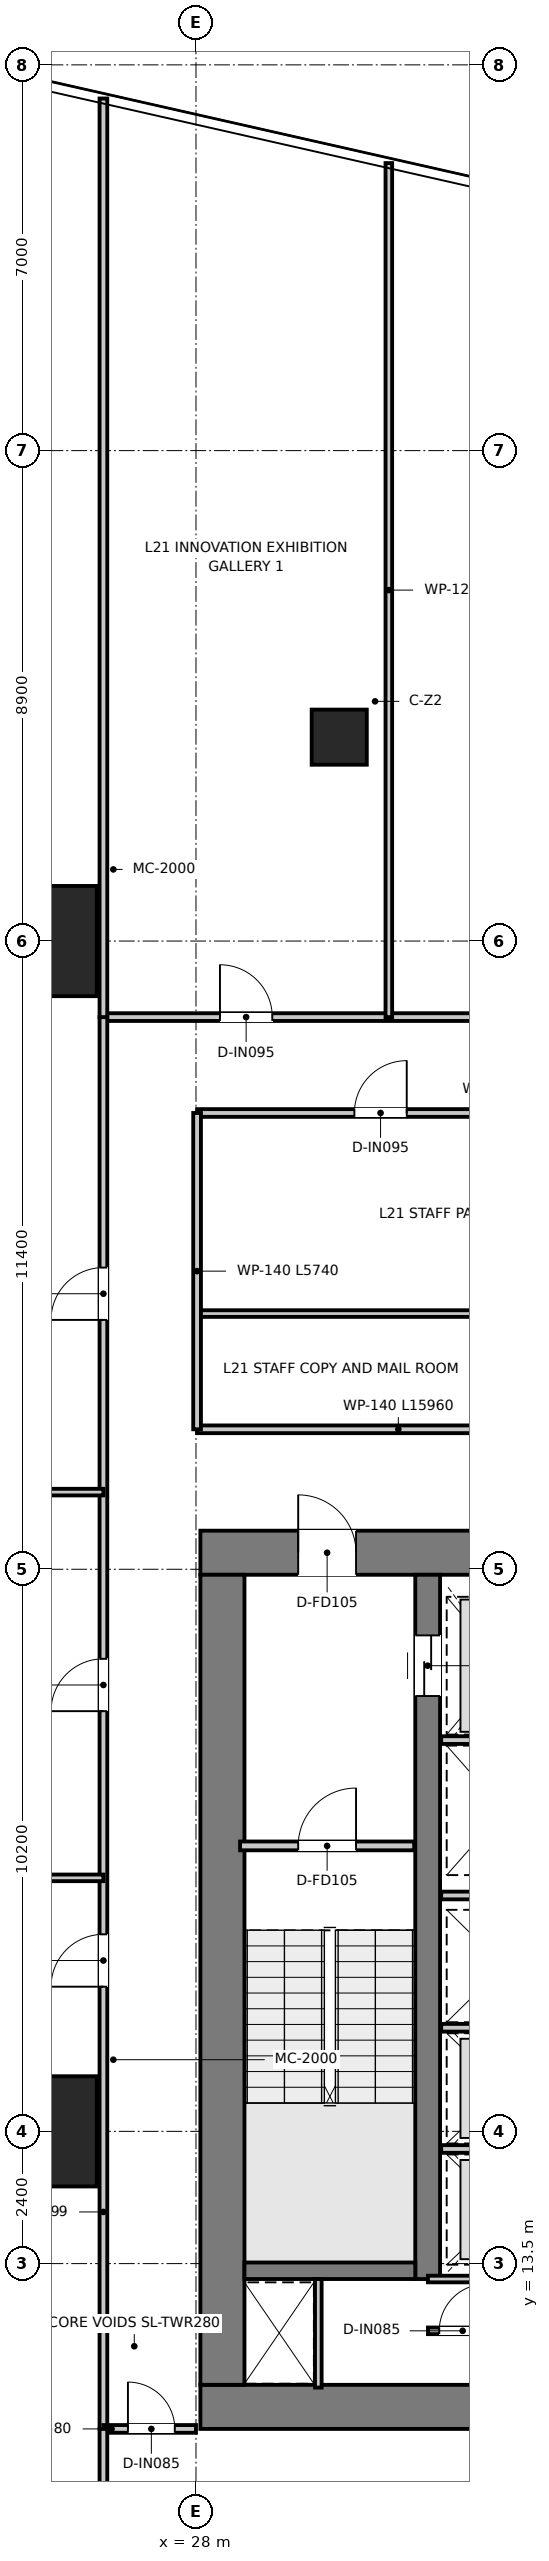
"""IFC4 building model, lengths in metres.
Left out: names, types, materials, properties, quantities, classifications, styles, units other than length and angle.
Written with IfcOpenShell. Run it as: python <this file> out.ifc"""

import sys

from ifc_helpers import new_model, si_unit, direction, frame, frame_2d, origin, origin_2d, place, context, subcontext, project, spatial, rectangle, extrude, source, transform, mapped, element, fill, save


model = new_model("IFC4")
c1 = context("Model", 3, precision=1e-05, world=origin(), true_north=direction((0.0, 1.0)))
c2 = subcontext(c1, "Body", "Model", "MODEL_VIEW")
j1 = project(units=[si_unit("LENGTHUNIT", "METRE"), si_unit("PLANEANGLEUNIT", "RADIAN")], contexts=[c1])
p1 = place(None, origin())
s1 = spatial("IfcSite", under=j1, at=p1, CompositionType="ELEMENT")
p2 = place(p1, origin())
s2 = spatial("IfcBuilding", under=s1, at=p2, CompositionType="ELEMENT")
p3 = place(p2, frame((0.0, 0.0, 90.05)))
s3 = spatial("IfcBuildingStorey", under=s2, at=p3, CompositionType="ELEMENT", Elevation=90.05)
p4 = place(p3, frame((28.08, 10.9, 0.0), z_axis=(0.0, 0.0, 1.0), x_axis=(1.0, 0.0, 0.0)))
e1 = element("IfcWall", 1, at=p4, inside=s3, PredefinedType="SHEAR", context=c2, shape_type="SweptSolid", body=[
    extrude(rectangle(XDim=15.84, YDim=0.8, at=frame_2d((7.92, 0.0))), origin(), (0.0, 0.0, 1.0), 3.95),
])
p5 = place(p3, frame((28.08, 26.4, 0.0), z_axis=(0.0, 0.0, 1.0), x_axis=(1.0, 0.0, 0.0)))
e2 = element("IfcWall", 2, at=p5, inside=s3, PredefinedType="SHEAR", context=c2, shape_type="SweptSolid", body=[
    extrude(rectangle(XDim=15.84, YDim=0.8, at=frame_2d((7.92, 0.0))), origin(), (0.0, 0.0, 1.0), 3.95),
])
p6 = place(p5, frame((7.22, 0.0, 0.0)))
e3 = element("IfcOpeningElement", 3, at=p6, cuts=e2, PredefinedType="OPENING", context=c2, shape_type="SweptSolid", body=[
    extrude(rectangle(XDim=1.4, YDim=2.2, at=frame_2d((0.7, 1.1))), frame((0.0, 0.41, 0.0), z_axis=(0.0, -1.0, 0.0), x_axis=(1.0, 0.0, 0.0)), (0.0, 0.0, 1.0), 0.82),
])
p7 = place(p5, frame((1.775, 0.0, 0.0)))
e4 = element("IfcOpeningElement", 4, at=p7, cuts=e2, PredefinedType="OPENING", context=c2, shape_type="SweptSolid", body=[
    extrude(rectangle(XDim=1.05, YDim=2.1, at=frame_2d((0.525, 1.05))), frame((0.0, 0.41, 0.0), z_axis=(0.0, -1.0, 0.0), x_axis=(1.0, 0.0, 0.0)), (0.0, 0.0, 1.0), 0.82),
])
p8 = place(p5, frame((13.015, 0.0, 0.0)))
e5 = element("IfcOpeningElement", 5, at=p8, cuts=e2, PredefinedType="OPENING", context=c2, shape_type="SweptSolid", body=[
    extrude(rectangle(XDim=1.05, YDim=2.1, at=frame_2d((0.525, 1.05))), frame((0.0, 0.41, 0.0), z_axis=(0.0, -1.0, 0.0), x_axis=(1.0, 0.0, 0.0)), (0.0, 0.0, 1.0), 0.82),
])
p9 = place(p3, frame((28.48, 11.3, 0.0), z_axis=(0.0, 0.0, 1.0), x_axis=(0.0, 1.0, 0.0)))
e6 = element("IfcWall", 6, at=p9, inside=s3, PredefinedType="SHEAR", context=c2, shape_type="SweptSolid", body=[
    extrude(rectangle(XDim=14.7, YDim=0.8, at=frame_2d((7.35, 0.0))), origin(), (0.0, 0.0, 1.0), 3.95),
])
p10 = place(p3, frame((32.205, 13.22, 0.0), z_axis=(0.0, 0.0, 1.0), x_axis=(0.0, 1.0, 0.0)))
e7 = element("IfcWall", 7, at=p10, inside=s3, PredefinedType="SHEAR", context=c2, shape_type="SweptSolid", body=[
    extrude(rectangle(XDim=12.78, YDim=0.45, at=frame_2d((6.39, 0.0))), origin(), (0.0, 0.0, 1.0), 3.95),
])
p11 = place(p10, frame((10.58, 0.0, 0.0)))
e8 = element("IfcOpeningElement", 8, at=p11, cuts=e7, PredefinedType="OPENING", context=c2, shape_type="SweptSolid", body=[
    extrude(rectangle(XDim=1.1, YDim=2.15, at=frame_2d((0.55, 1.075))), frame((0.0, 0.235, 0.0), z_axis=(0.0, -1.0, 0.0), x_axis=(1.0, 0.0, 0.0)), (0.0, 0.0, 1.0), 0.47),
])
p12 = place(p3, frame((28.88, 13.37, 0.0), z_axis=(0.0, 0.0, 1.0), x_axis=(1.0, 0.0, 0.0)))
e9 = element("IfcWall", 9, at=p12, inside=s3, PredefinedType="SHEAR", context=c2, shape_type="SweptSolid", body=[
    extrude(rectangle(XDim=3.1, YDim=0.3, at=frame_2d((1.55, 0.0))), origin(), (0.0, 0.0, 1.0), 3.95),
])
m1 = source(origin(), c2, "Body", "SweptSolid", [
    extrude(rectangle(XDim=2.0, YDim=2.0, at=origin_2d()), origin(), (0.0, 0.0, 1.0), 3.95),
])
for number, where, z_axis, x_axis in (
    (10, (25.2, 15.9, 0.0), (0.0, 0.0, 1.0), (1.0, 0.0, 0.0)),
    (11, (25.2, 37.5, 0.0), (0.0, 0.0, 1.0), (1.0, 0.0, 0.0)),
):
    element("IfcColumn", number, at=place(p3, frame(where, z_axis=z_axis, x_axis=x_axis)), inside=s3, PredefinedType="USERDEFINED", context=c2, shape_type="MappedRepresentation", body=[
        mapped(m1, transform((0.0, 0.0, 0.0), x_axis=(1.0, 0.0, 0.0), y_axis=(0.0, 1.0, 0.0), z_axis=(0.0, 0.0, 1.0), scale=1.0)),
    ])
m2 = source(origin(), c2, "Body", "SweptSolid", [
    extrude(rectangle(XDim=1.0, YDim=1.0, at=origin_2d()), origin(), (0.0, 0.0, 1.0), 3.95),
])
p13 = place(p3, frame((30.6, 41.2, 0.0), z_axis=(0.0, 0.0, 1.0), x_axis=(1.0, 0.0, 0.0)))
e12 = element("IfcColumn", 12, at=p13, inside=s3, PredefinedType="COLUMN", context=c2, shape_type="MappedRepresentation", body=[
    mapped(m2, transform((0.0, 0.0, 0.0), x_axis=(1.0, 0.0, 0.0), y_axis=(0.0, 1.0, 0.0), z_axis=(0.0, 0.0, 1.0), scale=1.0)),
])
p14 = place(p3, frame((28.8, 21.08, 0.0), z_axis=(0.0, 0.0, 1.0), x_axis=(1.0, 0.0, 0.0)))
e13 = element("IfcWall", 13, at=p14, inside=s3, PredefinedType="PARTITIONING", context=c2, shape_type="SweptSolid", body=[
    extrude(rectangle(XDim=3.16, YDim=0.16, at=frame_2d((1.58, 0.0))), origin(), (0.0, 0.0, 1.0), 3.67),
])
p15 = place(p14, frame((1.055, 0.0, 0.0)))
e14 = element("IfcOpeningElement", 14, at=p15, cuts=e13, PredefinedType="OPENING", context=c2, shape_type="SweptSolid", body=[
    extrude(rectangle(XDim=1.05, YDim=2.1, at=frame_2d((0.525, 1.05))), frame((0.0, 0.09, 0.0), z_axis=(0.0, -1.0, 0.0), x_axis=(1.0, 0.0, 0.0)), (0.0, 0.0, 1.0), 0.18),
])
p16 = place(p3, frame((32.45, 23.0, 0.0), z_axis=(0.0, 0.0, 1.0), x_axis=(1.0, 0.0, 0.0)))
e15 = element("IfcWall", 15, at=p16, inside=s3, PredefinedType="PARTITIONING", context=c2, shape_type="SweptSolid", body=[
    extrude(rectangle(XDim=2.27, YDim=0.14, at=frame_2d((1.135, 0.0))), origin(), (0.0, 0.0, 1.0), 2.47),
])
for number, where, z_axis, x_axis in (
    (16, (32.45, 17.78, 0.0), (0.0, 0.0, 1.0), (1.0, 0.0, 0.0)),
    (17, (32.45, 20.18, 0.0), (0.0, 0.0, 1.0), (1.0, 0.0, 0.0)),
    (18, (32.45, 15.58, 0.0), (0.0, 0.0, 1.0), (1.0, 0.0, 0.0)),
):
    element("IfcWall", number, at=place(p3, frame(where, z_axis=z_axis, x_axis=x_axis)), inside=s3, PredefinedType="PARTITIONING", context=c2, shape_type="SweptSolid", body=[
        extrude(rectangle(XDim=2.27, YDim=0.14, at=frame_2d((1.135, 0.0))), origin(), (0.0, 0.0, 1.0), 3.67),
    ])
p17 = place(p3, frame((30.22, 11.25, 0.0), z_axis=(0.0, 0.0, 1.0), x_axis=(0.0, 1.0, 0.0)))
e19 = element("IfcWall", 19, at=p17, inside=s3, PredefinedType="PARTITIONING", context=c2, shape_type="SweptSolid", body=[
    extrude(rectangle(XDim=1.97, YDim=0.12, at=frame_2d((0.985, 0.0))), origin(), (0.0, 0.0, 1.0), 3.67),
])
p18 = place(p3, frame((32.21, 13.22, 0.0), z_axis=(0.0, 0.0, 1.0), x_axis=(1.0, 0.0, 0.0)))
e20 = element("IfcWall", 20, at=p18, inside=s3, PredefinedType="PARTITIONING", context=c2, shape_type="SweptSolid", body=[
    extrude(rectangle(XDim=7.58, YDim=0.12, at=frame_2d((3.79, 0.0))), origin(), (0.0, 0.0, 1.0), 3.67),
])
p19 = place(p18, frame((3.365, 0.0, 0.0)))
e21 = element("IfcOpeningElement", 21, at=p19, cuts=e20, PredefinedType="OPENING", context=c2, shape_type="SweptSolid", body=[
    extrude(rectangle(XDim=0.85, YDim=2.1, at=frame_2d((0.425, 1.05))), frame((0.0, 0.07, 0.0), z_axis=(0.0, -1.0, 0.0), x_axis=(1.0, 0.0, 0.0)), (0.0, 0.0, 1.0), 0.14),
])
p20 = place(p3, frame((32.21, 12.28, 0.0), z_axis=(0.0, 0.0, 1.0), x_axis=(1.0, 0.0, 0.0)))
e22 = element("IfcWall", 22, at=p20, inside=s3, PredefinedType="PARTITIONING", context=c2, shape_type="SweptSolid", body=[
    extrude(rectangle(XDim=7.58, YDim=0.12, at=frame_2d((3.79, 0.0))), origin(), (0.0, 0.0, 1.0), 3.67),
])
p21 = place(p20, frame((0.205, 0.0, 0.0)))
e23 = element("IfcOpeningElement", 23, at=p21, cuts=e22, PredefinedType="OPENING", context=c2, shape_type="SweptSolid", body=[
    extrude(rectangle(XDim=0.85, YDim=2.1, at=frame_2d((0.425, 1.05))), frame((0.0, 0.07, 0.0), z_axis=(0.0, -1.0, 0.0), x_axis=(1.0, 0.0, 0.0)), (0.0, 0.0, 1.0), 0.14),
])
p22 = place(p20, frame((2.095, 0.0, 0.0)))
e24 = element("IfcOpeningElement", 24, at=p22, cuts=e22, PredefinedType="OPENING", context=c2, shape_type="SweptSolid", body=[
    extrude(rectangle(XDim=0.85, YDim=2.1, at=frame_2d((0.425, 1.05))), frame((0.0, 0.07, 0.0), z_axis=(0.0, -1.0, 0.0), x_axis=(1.0, 0.0, 0.0)), (0.0, 0.0, 1.0), 0.14),
])
p23 = place(p20, frame((4.635, 0.0, 0.0)))
e25 = element("IfcOpeningElement", 25, at=p23, cuts=e22, PredefinedType="OPENING", context=c2, shape_type="SweptSolid", body=[
    extrude(rectangle(XDim=0.85, YDim=2.1, at=frame_2d((0.425, 1.05))), frame((0.0, 0.07, 0.0), z_axis=(0.0, -1.0, 0.0), x_axis=(1.0, 0.0, 0.0)), (0.0, 0.0, 1.0), 0.14),
])
p24 = place(p20, frame((6.525, 0.0, 0.0)))
e26 = element("IfcOpeningElement", 26, at=p24, cuts=e22, PredefinedType="OPENING", context=c2, shape_type="SweptSolid", body=[
    extrude(rectangle(XDim=0.85, YDim=2.1, at=frame_2d((0.425, 1.05))), frame((0.0, 0.07, 0.0), z_axis=(0.0, -1.0, 0.0), x_axis=(1.0, 0.0, 0.0)), (0.0, 0.0, 1.0), 0.14),
])
p25 = place(p3, frame((28.02, 28.64, 0.0), z_axis=(0.0, 0.0, 1.0), x_axis=(1.0, 0.0, 0.0)))
e27 = element("IfcWall", 27, at=p25, inside=s3, PredefinedType="PARTITIONING", context=c2, shape_type="SweptSolid", body=[
    extrude(rectangle(XDim=15.96, YDim=0.14, at=frame_2d((7.98, 0.0))), origin(), (0.0, 0.0, 1.0), 3.08),
])
p26 = place(p25, frame((7.455, 0.0, 0.0)))
e28 = element("IfcOpeningElement", 28, at=p26, cuts=e27, PredefinedType="OPENING", context=c2, shape_type="SweptSolid", body=[
    extrude(rectangle(XDim=1.05, YDim=2.15, at=frame_2d((0.525, 1.075))), frame((0.0, 0.08, 0.0), z_axis=(0.0, -1.0, 0.0), x_axis=(1.0, 0.0, 0.0)), (0.0, 0.0, 1.0), 0.16),
])
p27 = place(p3, frame((28.02, 30.74, 0.0), z_axis=(0.0, 0.0, 1.0), x_axis=(1.0, 0.0, 0.0)))
e29 = element("IfcWall", 29, at=p27, inside=s3, PredefinedType="PARTITIONING", context=c2, shape_type="SweptSolid", body=[
    extrude(rectangle(XDim=15.96, YDim=0.12, at=frame_2d((7.98, 0.0))), origin(), (0.0, 0.0, 1.0), 3.08),
])
p28 = place(p3, frame((28.02, 34.38, 0.0), z_axis=(0.0, 0.0, 1.0), x_axis=(1.0, 0.0, 0.0)))
e30 = element("IfcWall", 30, at=p28, inside=s3, PredefinedType="PARTITIONING", context=c2, shape_type="SweptSolid", body=[
    extrude(rectangle(XDim=15.96, YDim=0.14, at=frame_2d((7.98, 0.0))), origin(), (0.0, 0.0, 1.0), 3.08),
])
p29 = place(p28, frame((7.83, 0.0, 0.0)))
e31 = element("IfcOpeningElement", 31, at=p29, cuts=e30, PredefinedType="OPENING", context=c2, shape_type="SweptSolid", body=[
    extrude(rectangle(XDim=0.9, YDim=2.1, at=frame_2d((0.45, 1.05))), frame((0.0, 0.08, 0.0), z_axis=(0.0, -1.0, 0.0), x_axis=(1.0, 0.0, 0.0)), (0.0, 0.0, 1.0), 0.16),
])
p30 = place(p28, frame((11.03, 0.0, 0.0)))
e32 = element("IfcOpeningElement", 32, at=p30, cuts=e30, PredefinedType="OPENING", context=c2, shape_type="SweptSolid", body=[
    extrude(rectangle(XDim=0.9, YDim=2.1, at=frame_2d((0.45, 1.05))), frame((0.0, 0.08, 0.0), z_axis=(0.0, -1.0, 0.0), x_axis=(1.0, 0.0, 0.0)), (0.0, 0.0, 1.0), 0.16),
])
p31 = place(p28, frame((14.055, 0.0, 0.0)))
e33 = element("IfcOpeningElement", 33, at=p31, cuts=e30, PredefinedType="OPENING", context=c2, shape_type="SweptSolid", body=[
    extrude(rectangle(XDim=0.95, YDim=2.1, at=frame_2d((0.475, 1.05))), frame((0.0, 0.08, 0.0), z_axis=(0.0, -1.0, 0.0), x_axis=(1.0, 0.0, 0.0)), (0.0, 0.0, 1.0), 0.16),
])
p32 = place(p28, frame((2.855, 0.0, 0.0)))
e34 = element("IfcOpeningElement", 34, at=p32, cuts=e30, PredefinedType="OPENING", context=c2, shape_type="SweptSolid", body=[
    extrude(rectangle(XDim=0.95, YDim=2.1, at=frame_2d((0.475, 1.05))), frame((0.0, 0.08, 0.0), z_axis=(0.0, -1.0, 0.0), x_axis=(1.0, 0.0, 0.0)), (0.0, 0.0, 1.0), 0.16),
])
p33 = place(p3, frame((28.02, 28.64, 0.0), z_axis=(0.0, 0.0, 1.0), x_axis=(0.0, 1.0, 0.0)))
e35 = element("IfcWall", 35, at=p33, inside=s3, PredefinedType="PARTITIONING", context=c2, shape_type="SweptSolid", body=[
    extrude(rectangle(XDim=5.74, YDim=0.14, at=frame_2d((2.87, 0.0))), origin(), (0.0, 0.0, 1.0), 3.27),
])
p34 = place(p3, frame((26.32, 36.12, 0.0), z_axis=(0.0, 0.0, 1.0), x_axis=(1.0, 0.0, 0.0)))
e36 = element("IfcWall", 36, at=p34, inside=s3, PredefinedType="PARTITIONING", context=c2, shape_type="SweptSolid", body=[
    extrude(rectangle(XDim=19.36, YDim=0.14, at=frame_2d((9.68, 0.0))), origin(), (0.0, 0.0, 1.0), 3.08),
])
p35 = place(p34, frame((2.115, 0.0, 0.0)))
e37 = element("IfcOpeningElement", 37, at=p35, cuts=e36, PredefinedType="OPENING", context=c2, shape_type="SweptSolid", body=[
    extrude(rectangle(XDim=0.95, YDim=2.1, at=frame_2d((0.475, 1.05))), frame((0.0, 0.08, 0.0), z_axis=(0.0, -1.0, 0.0), x_axis=(1.0, 0.0, 0.0)), (0.0, 0.0, 1.0), 0.16),
])
p36 = place(p34, frame((8.705, 0.0, 0.0)))
e38 = element("IfcOpeningElement", 38, at=p36, cuts=e36, PredefinedType="OPENING", context=c2, shape_type="SweptSolid", body=[
    extrude(rectangle(XDim=0.95, YDim=2.1, at=frame_2d((0.475, 1.05))), frame((0.0, 0.08, 0.0), z_axis=(0.0, -1.0, 0.0), x_axis=(1.0, 0.0, 0.0)), (0.0, 0.0, 1.0), 0.16),
])
p37 = place(p34, frame((15.795, 0.0, 0.0)))
e39 = element("IfcOpeningElement", 39, at=p37, cuts=e36, PredefinedType="OPENING", context=c2, shape_type="SweptSolid", body=[
    extrude(rectangle(XDim=0.95, YDim=2.1, at=frame_2d((0.475, 1.05))), frame((0.0, 0.08, 0.0), z_axis=(0.0, -1.0, 0.0), x_axis=(1.0, 0.0, 0.0)), (0.0, 0.0, 1.0), 0.16),
])
p38 = place(p3, frame((26.32, 10.5, 0.0), z_axis=(0.0, 0.0, 1.0), x_axis=(0.0, 1.0, 0.0)))
e40 = element("IfcWall", 40, at=p38, inside=s3, PredefinedType="PARTITIONING", context=c2, shape_type="SweptSolid", body=[
    extrude(rectangle(XDim=25.62, YDim=0.14, at=frame_2d((12.81, 0.0))), origin(), (0.0, 0.0, 1.0), 2.97),
])
p39 = place(p38, frame((8.025, 0.0, 0.0)))
e41 = element("IfcOpeningElement", 41, at=p39, cuts=e40, PredefinedType="OPENING", context=c2, shape_type="SweptSolid", body=[
    extrude(rectangle(XDim=0.95, YDim=2.1, at=frame_2d((0.475, 1.05))), frame((0.0, 0.08, 0.0), z_axis=(0.0, -1.0, 0.0), x_axis=(1.0, 0.0, 0.0)), (0.0, 0.0, 1.0), 0.16),
])
p40 = place(p38, frame((13.025, 0.0, 0.0)))
e42 = element("IfcOpeningElement", 42, at=p40, cuts=e40, PredefinedType="OPENING", context=c2, shape_type="SweptSolid", body=[
    extrude(rectangle(XDim=0.95, YDim=2.1, at=frame_2d((0.475, 1.05))), frame((0.0, 0.08, 0.0), z_axis=(0.0, -1.0, 0.0), x_axis=(1.0, 0.0, 0.0)), (0.0, 0.0, 1.0), 0.16),
])
p41 = place(p38, frame((20.125, 0.0, 0.0)))
e43 = element("IfcOpeningElement", 43, at=p41, cuts=e40, PredefinedType="OPENING", context=c2, shape_type="SweptSolid", body=[
    extrude(rectangle(XDim=0.95, YDim=2.1, at=frame_2d((0.475, 1.05))), frame((0.0, 0.08, 0.0), z_axis=(0.0, -1.0, 0.0), x_axis=(1.0, 0.0, 0.0)), (0.0, 0.0, 1.0), 0.16),
])
p42 = place(p3, frame((26.32, 10.5, 0.0), z_axis=(0.0, 0.0, 1.0), x_axis=(1.0, 0.0, 0.0)))
e44 = element("IfcWall", 44, at=p42, inside=s3, PredefinedType="PARTITIONING", context=c2, shape_type="SweptSolid", body=[
    extrude(rectangle(XDim=1.68, YDim=0.14, at=frame_2d((0.84, 0.0))), origin(), (0.0, 0.0, 1.0), 3.67),
])
p43 = place(p42, frame((0.445, 0.0, 0.0)))
e45 = element("IfcOpeningElement", 45, at=p43, cuts=e44, PredefinedType="OPENING", context=c2, shape_type="SweptSolid", body=[
    extrude(rectangle(XDim=0.85, YDim=2.1, at=frame_2d((0.425, 1.05))), frame((0.0, 0.08, 0.0), z_axis=(0.0, -1.0, 0.0), x_axis=(1.0, 0.0, 0.0)), (0.0, 0.0, 1.0), 0.16),
])
p44 = place(p3, frame((26.32, 36.12, 0.0), z_axis=(0.0, 0.0, 1.0), x_axis=(0.0, 1.0, 0.0)))
e46 = element("IfcWall", 46, at=p44, inside=s3, PredefinedType="PARTITIONING", context=c2, shape_type="SweptSolid", body=[
    extrude(rectangle(XDim=16.67, YDim=0.14, at=frame_2d((8.335, 0.0))), origin(), (0.0, 0.0, 1.0), 2.97),
])
p45 = place(p3, frame((26.32, 4.991, 0.0), z_axis=(0.0, 0.0, 1.0), x_axis=(0.0, 1.0, 0.0)))
e47 = element("IfcWall", 47, at=p45, inside=s3, PredefinedType="PARTITIONING", context=c2, shape_type="SweptSolid", body=[
    extrude(rectangle(XDim=5.509, YDim=0.14, at=frame_2d((2.754, 0.0))), origin(), (0.0, 0.0, 1.0), 3.67),
])
p46 = place(p3, frame((31.5, 36.12, 0.0), z_axis=(0.0, 0.0, 1.0), x_axis=(0.0, 1.0, 0.0)))
e48 = element("IfcWall", 48, at=p46, inside=s3, PredefinedType="PARTITIONING", context=c2, shape_type="SweptSolid", body=[
    extrude(rectangle(XDim=15.497, YDim=0.12, at=frame_2d((7.749, 0.0))), origin(), (0.0, 0.0, 1.0), 2.97),
])
p47 = place(p3, frame((10.698, 20.5, 0.0), z_axis=(0.0, 0.0, 1.0), x_axis=(1.0, 0.0, 0.0)))
e49 = element("IfcWall", 49, at=p47, inside=s3, PredefinedType="PARTITIONING", context=c2, shape_type="SweptSolid", body=[
    extrude(rectangle(XDim=15.622, YDim=0.12, at=frame_2d((7.811, 0.0))), origin(), (0.0, 0.0, 1.0), 2.97),
])
p48 = place(p3, frame((12.282, 27.5, 0.0), z_axis=(0.0, 0.0, 1.0), x_axis=(1.0, 0.0, 0.0)))
e50 = element("IfcWall", 50, at=p48, inside=s3, PredefinedType="PARTITIONING", context=c2, shape_type="SweptSolid", body=[
    extrude(rectangle(XDim=14.038, YDim=0.12, at=frame_2d((7.019, 0.0))), origin(), (0.0, 0.0, 1.0), 2.97),
])
p49 = place(p15, origin())
e51 = element("IfcDoor", 51, at=p49, inside=s3, OperationType="SINGLE_SWING_RIGHT", PredefinedType="DOOR", context=c2, shape_type="SweptSolid", body=[
    extrude(rectangle(XDim=1.05, YDim=2.1, at=frame_2d((0.525, 1.05))), frame((0.0, 0.025, 0.0), z_axis=(0.0, -1.0, 0.0), x_axis=(1.0, 0.0, 0.0)), (0.0, 0.0, 1.0), 0.05),
])
fill(e14, e51)
p50 = place(p7, origin())
e52 = element("IfcDoor", 52, at=p50, inside=s3, OperationType="SINGLE_SWING_LEFT", PredefinedType="DOOR", context=c2, shape_type="SweptSolid", body=[
    extrude(rectangle(XDim=1.05, YDim=2.1, at=frame_2d((0.525, 1.05))), frame((0.0, 0.025, 0.0), z_axis=(0.0, -1.0, 0.0), x_axis=(1.0, 0.0, 0.0)), (0.0, 0.0, 1.0), 0.05),
])
fill(e4, e52)
p51 = place(p11, origin())
e53 = element("IfcDoor", 53, at=p51, inside=s3, OperationType="DOUBLE_DOOR_SLIDING", PredefinedType="DOOR", context=c2, shape_type="SweptSolid", body=[
    extrude(rectangle(XDim=1.1, YDim=2.15, at=frame_2d((0.55, 1.075))), frame((0.0, 0.025, 0.0), z_axis=(0.0, -1.0, 0.0), x_axis=(1.0, 0.0, 0.0)), (0.0, 0.0, 1.0), 0.05),
])
fill(e8, e53)
p52 = place(p21, origin())
e54 = element("IfcDoor", 54, at=p52, inside=s3, OperationType="SINGLE_SWING_RIGHT", PredefinedType="DOOR", context=c2, shape_type="SweptSolid", body=[
    extrude(rectangle(XDim=0.85, YDim=2.1, at=frame_2d((0.425, 1.05))), frame((0.0, 0.025, 0.0), z_axis=(0.0, -1.0, 0.0), x_axis=(1.0, 0.0, 0.0)), (0.0, 0.0, 1.0), 0.05),
])
fill(e23, e54)
p53 = place(p32, origin())
e55 = element("IfcDoor", 55, at=p53, inside=s3, OperationType="SINGLE_SWING_RIGHT", PredefinedType="DOOR", context=c2, shape_type="SweptSolid", body=[
    extrude(rectangle(XDim=0.95, YDim=2.1, at=frame_2d((0.475, 1.05))), frame((0.0, 0.025, 0.0), z_axis=(0.0, -1.0, 0.0), x_axis=(1.0, 0.0, 0.0)), (0.0, 0.0, 1.0), 0.05),
])
fill(e34, e55)
p54 = place(p35, origin())
e56 = element("IfcDoor", 56, at=p54, inside=s3, OperationType="SINGLE_SWING_LEFT", PredefinedType="DOOR", context=c2, shape_type="SweptSolid", body=[
    extrude(rectangle(XDim=0.95, YDim=2.1, at=frame_2d((0.475, 1.05))), frame((0.0, 0.025, 0.0), z_axis=(0.0, -1.0, 0.0), x_axis=(1.0, 0.0, 0.0)), (0.0, 0.0, 1.0), 0.05),
])
fill(e37, e56)
p55 = place(p39, origin())
e57 = element("IfcDoor", 57, at=p55, inside=s3, OperationType="SINGLE_SWING_LEFT", PredefinedType="DOOR", context=c2, shape_type="SweptSolid", body=[
    extrude(rectangle(XDim=0.95, YDim=2.1, at=frame_2d((0.475, 1.05))), frame((0.0, 0.025, 0.0), z_axis=(0.0, -1.0, 0.0), x_axis=(1.0, 0.0, 0.0)), (0.0, 0.0, 1.0), 0.05),
])
fill(e41, e57)
p56 = place(p40, origin())
e58 = element("IfcDoor", 58, at=p56, inside=s3, OperationType="SINGLE_SWING_LEFT", PredefinedType="DOOR", context=c2, shape_type="SweptSolid", body=[
    extrude(rectangle(XDim=0.95, YDim=2.1, at=frame_2d((0.475, 1.05))), frame((0.0, 0.025, 0.0), z_axis=(0.0, -1.0, 0.0), x_axis=(1.0, 0.0, 0.0)), (0.0, 0.0, 1.0), 0.05),
])
fill(e42, e58)
p57 = place(p41, origin())
e59 = element("IfcDoor", 59, at=p57, inside=s3, OperationType="SINGLE_SWING_LEFT", PredefinedType="DOOR", context=c2, shape_type="SweptSolid", body=[
    extrude(rectangle(XDim=0.95, YDim=2.1, at=frame_2d((0.475, 1.05))), frame((0.0, 0.025, 0.0), z_axis=(0.0, -1.0, 0.0), x_axis=(1.0, 0.0, 0.0)), (0.0, 0.0, 1.0), 0.05),
])
fill(e43, e59)
p58 = place(p43, origin())
e60 = element("IfcDoor", 60, at=p58, inside=s3, OperationType="SINGLE_SWING_LEFT", PredefinedType="DOOR", context=c2, shape_type="SweptSolid", body=[
    extrude(rectangle(XDim=0.85, YDim=2.1, at=frame_2d((0.425, 1.05))), frame((0.0, 0.025, 0.0), z_axis=(0.0, -1.0, 0.0), x_axis=(1.0, 0.0, 0.0)), (0.0, 0.0, 1.0), 0.05),
])
fill(e45, e60)
save(model, sys.argv[1])
